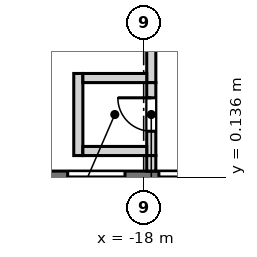
"""IFC4 building model, lengths in metres.
Left out: names, types, materials, properties, quantities, classifications, styles, units other than length and angle.
Written with IfcOpenShell. Run it as: python <this file> out.ifc"""

import sys

from ifc_helpers import new_model, si_unit, direction, frame, frame_2d, origin, place, context, subcontext, project, spatial, rectangle, extrude, element, fill, save


model = new_model("IFC4")
c1 = context("Model", 3, precision=1e-05, world=origin(), true_north=direction((0.0, 1.0)))
c2 = subcontext(c1, "Body", "Model", "MODEL_VIEW")
j1 = project(units=[si_unit("LENGTHUNIT", "METRE"), si_unit("PLANEANGLEUNIT", "RADIAN")], contexts=[c1])
p1 = place(None, origin())
s1 = spatial("IfcSite", under=j1, at=p1, CompositionType="ELEMENT")
p2 = place(p1, origin())
s2 = spatial("IfcBuilding", under=s1, at=p2, CompositionType="ELEMENT")
p3 = place(p2, frame((0.0, 0.0, 47.5)))
s3 = spatial("IfcBuildingStorey", under=s2, at=p3, CompositionType="ELEMENT", Elevation=47.5)
p4 = place(p3, frame((-27.628, 0.17, 0.0), z_axis=(0.0, 0.0, 1.0), x_axis=(1.0, 0.0, 0.0)))
e1 = element("IfcWall", 1, at=p4, inside=s3, PredefinedType="SOLIDWALL", context=c2, shape_type="SweptSolid", body=[
    extrude(rectangle(XDim=55.255, YDim=0.34, at=frame_2d((27.628, 0.0))), origin(), (0.0, 0.0, 1.0), 5.1),
])
p5 = place(p4, frame((1.128, 0.0, 0.9)))
e2 = element("IfcOpeningElement", 2, at=p5, cuts=e1, PredefinedType="OPENING", context=c2, shape_type="SweptSolid", body=[
    extrude(rectangle(XDim=1.885, YDim=3.0, at=frame_2d((0.942, 1.5))), frame((0.0, 0.18, 0.0), z_axis=(0.0, -1.0, 0.0), x_axis=(1.0, 0.0, 0.0)), (0.0, 0.0, 1.0), 0.36),
])
p6 = place(p4, frame((4.128, 0.0, 0.9)))
e3 = element("IfcOpeningElement", 3, at=p6, cuts=e1, PredefinedType="OPENING", context=c2, shape_type="SweptSolid", body=[
    extrude(rectangle(XDim=1.885, YDim=3.0, at=frame_2d((0.942, 1.5))), frame((0.0, 0.18, 0.0), z_axis=(0.0, -1.0, 0.0), x_axis=(1.0, 0.0, 0.0)), (0.0, 0.0, 1.0), 0.36),
])
p7 = place(p4, frame((7.128, 0.0, 0.9)))
e4 = element("IfcOpeningElement", 4, at=p7, cuts=e1, PredefinedType="OPENING", context=c2, shape_type="SweptSolid", body=[
    extrude(rectangle(XDim=1.885, YDim=3.0, at=frame_2d((0.942, 1.5))), frame((0.0, 0.18, 0.0), z_axis=(0.0, -1.0, 0.0), x_axis=(1.0, 0.0, 0.0)), (0.0, 0.0, 1.0), 0.36),
])
p8 = place(p4, frame((10.128, 0.0, 0.9)))
e5 = element("IfcOpeningElement", 5, at=p8, cuts=e1, PredefinedType="OPENING", context=c2, shape_type="SweptSolid", body=[
    extrude(rectangle(XDim=1.885, YDim=3.0, at=frame_2d((0.942, 1.5))), frame((0.0, 0.18, 0.0), z_axis=(0.0, -1.0, 0.0), x_axis=(1.0, 0.0, 0.0)), (0.0, 0.0, 1.0), 0.36),
])
p9 = place(p4, frame((43.128, 0.0, 0.9)))
e6 = element("IfcOpeningElement", 6, at=p9, cuts=e1, PredefinedType="OPENING", context=c2, shape_type="SweptSolid", body=[
    extrude(rectangle(XDim=1.885, YDim=3.0, at=frame_2d((0.942, 1.5))), frame((0.0, 0.18, 0.0), z_axis=(0.0, -1.0, 0.0), x_axis=(1.0, 0.0, 0.0)), (0.0, 0.0, 1.0), 0.36),
])
p10 = place(p4, frame((46.128, 0.0, 0.9)))
e7 = element("IfcOpeningElement", 7, at=p10, cuts=e1, PredefinedType="OPENING", context=c2, shape_type="SweptSolid", body=[
    extrude(rectangle(XDim=1.885, YDim=3.0, at=frame_2d((0.942, 1.5))), frame((0.0, 0.18, 0.0), z_axis=(0.0, -1.0, 0.0), x_axis=(1.0, 0.0, 0.0)), (0.0, 0.0, 1.0), 0.36),
])
p11 = place(p4, frame((49.128, 0.0, 0.9)))
e8 = element("IfcOpeningElement", 8, at=p11, cuts=e1, PredefinedType="OPENING", context=c2, shape_type="SweptSolid", body=[
    extrude(rectangle(XDim=1.885, YDim=3.0, at=frame_2d((0.942, 1.5))), frame((0.0, 0.18, 0.0), z_axis=(0.0, -1.0, 0.0), x_axis=(1.0, 0.0, 0.0)), (0.0, 0.0, 1.0), 0.36),
])
p12 = place(p4, frame((52.128, 0.0, 0.9)))
e9 = element("IfcOpeningElement", 9, at=p12, cuts=e1, PredefinedType="OPENING", context=c2, shape_type="SweptSolid", body=[
    extrude(rectangle(XDim=1.885, YDim=3.0, at=frame_2d((0.942, 1.5))), frame((0.0, 0.18, 0.0), z_axis=(0.0, -1.0, 0.0), x_axis=(1.0, 0.0, 0.0)), (0.0, 0.0, 1.0), 0.36),
])
p13 = place(p3, frame((-17.75, 3.25, 0.0), z_axis=(0.0, 0.0, 1.0), x_axis=(0.0, 1.0, 0.0)))
e10 = element("IfcWall", 10, at=p13, inside=s3, PredefinedType="SOLIDWALL", context=c2, shape_type="SweptSolid", body=[
    extrude(rectangle(XDim=9.007, YDim=0.3, at=frame_2d((4.503, 0.0))), origin(), (0.0, 0.0, 1.0), 5.1),
])
p14 = place(p13, frame((2.75, 0.0, 0.0)))
e11 = element("IfcOpeningElement", 11, at=p14, cuts=e10, PredefinedType="OPENING", context=c2, shape_type="SweptSolid", body=[
    extrude(rectangle(XDim=2.0, YDim=2.1, at=frame_2d((1.0, 1.05))), frame((0.0, 0.16, 0.0), z_axis=(0.0, -1.0, 0.0), x_axis=(1.0, 0.0, 0.0)), (0.0, 0.0, 1.0), 0.32),
])
p15 = place(p3, frame((-20.15, 0.85, 0.0), z_axis=(0.0, 0.0, 1.0), x_axis=(0.0, 1.0, 0.0)))
e12 = element("IfcWall", 12, at=p15, inside=s3, PredefinedType="SOLIDWALL", context=c2, shape_type="SweptSolid", body=[
    extrude(rectangle(XDim=2.7, YDim=0.3, at=frame_2d((1.35, 0.0))), origin(), (0.0, 0.0, 1.0), 5.1),
])
p16 = place(p3, frame((-17.75, 0.85, 0.0), z_axis=(0.0, 0.0, 1.0), x_axis=(0.0, 1.0, 0.0)))
e13 = element("IfcWall", 13, at=p16, inside=s3, PredefinedType="SOLIDWALL", context=c2, shape_type="SweptSolid", body=[
    extrude(rectangle(XDim=2.4, YDim=0.3, at=frame_2d((1.2, 0.0))), origin(), (0.0, 0.0, 1.0), 5.1),
])
p17 = place(p16, frame((0.8, 0.0, 0.0)))
e14 = element("IfcOpeningElement", 14, at=p17, cuts=e13, PredefinedType="OPENING", context=c2, shape_type="SweptSolid", body=[
    extrude(rectangle(XDim=1.1, YDim=2.1, at=frame_2d((0.55, 1.05))), frame((0.0, 0.16, 0.0), z_axis=(0.0, -1.0, 0.0), x_axis=(1.0, 0.0, 0.0)), (0.0, 0.0, 1.0), 0.32),
])
p18 = place(p3, frame((-17.9, 1.0, 0.0), z_axis=(0.0, 0.0, 1.0), x_axis=(-1.0, 0.0, 0.0)))
e15 = element("IfcWall", 15, at=p18, inside=s3, PredefinedType="SOLIDWALL", context=c2, shape_type="SweptSolid", body=[
    extrude(rectangle(XDim=2.1, YDim=0.3, at=frame_2d((1.05, 0.0))), origin(), (0.0, 0.0, 1.0), 4.0),
])
p19 = place(p3, frame((-20.0, 3.4, 0.0), z_axis=(0.0, 0.0, 1.0), x_axis=(1.0, 0.0, 0.0)))
e16 = element("IfcWall", 16, at=p19, inside=s3, PredefinedType="SOLIDWALL", context=c2, shape_type="SweptSolid", body=[
    extrude(rectangle(XDim=2.1, YDim=0.3, at=frame_2d((1.05, 0.0))), origin(), (0.0, 0.0, 1.0), 5.1),
])
p20 = place(p3, frame((-17.75, 0.34, 0.0), z_axis=(0.0, 0.0, 1.0), x_axis=(0.0, 1.0, 0.0)))
e17 = element("IfcWall", 17, at=p20, inside=s3, PredefinedType="SOLIDWALL", context=c2, shape_type="SweptSolid", body=[
    extrude(rectangle(XDim=0.51, YDim=0.3, at=frame_2d((0.255, 0.0))), origin(), (0.0, 0.0, 1.0), 5.1),
])
p21 = place(p7, origin())
e18 = element("IfcWindow", 18, at=p21, inside=s3, PartitioningType="SINGLE_PANEL", PredefinedType="WINDOW", context=c2, shape_type="SweptSolid", body=[
    extrude(rectangle(XDim=1.885, YDim=3.0, at=frame_2d((0.942, 1.5))), frame((0.0, 0.11, 0.0), z_axis=(0.0, -1.0, 0.0), x_axis=(1.0, 0.0, 0.0)), (0.0, 0.0, 1.0), 0.06),
])
fill(e4, e18)
p22 = place(p8, origin())
e19 = element("IfcWindow", 19, at=p22, inside=s3, PartitioningType="SINGLE_PANEL", PredefinedType="WINDOW", context=c2, shape_type="SweptSolid", body=[
    extrude(rectangle(XDim=1.885, YDim=3.0, at=frame_2d((0.942, 1.5))), frame((0.0, 0.11, 0.0), z_axis=(0.0, -1.0, 0.0), x_axis=(1.0, 0.0, 0.0)), (0.0, 0.0, 1.0), 0.06),
])
fill(e5, e19)
p23 = place(p17, origin())
e20 = element("IfcDoor", 20, at=p23, inside=s3, OperationType="SINGLE_SWING_RIGHT", PredefinedType="DOOR", context=c2, shape_type="SweptSolid", body=[
    extrude(rectangle(XDim=1.1, YDim=2.1, at=frame_2d((0.55, 1.05))), frame((0.0, 0.025, 0.0), z_axis=(0.0, -1.0, 0.0), x_axis=(1.0, 0.0, 0.0)), (0.0, 0.0, 1.0), 0.05),
])
fill(e14, e20)
save(model, sys.argv[1])
